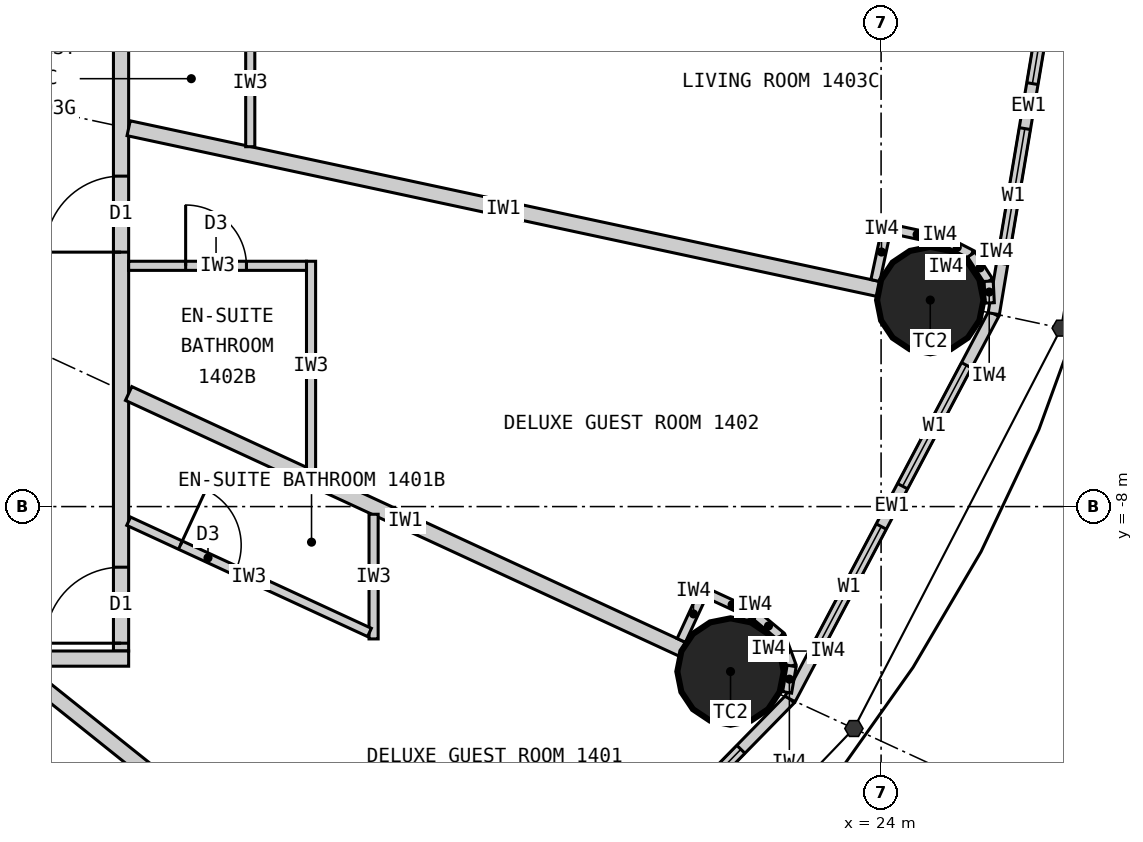
"""IFC4 building model, lengths in metres.
Left out: names, types, materials, properties, quantities, classifications, styles, units other than length and angle.
Written with IfcOpenShell. Run it as: python <this file> out.ifc"""

import sys

from ifc_helpers import new_model, si_unit, direction, frame, frame_2d, origin, origin_2d, place, context, subcontext, project, spatial, rectangle, circle, extrude, element, fill, save


model = new_model("IFC4")
c1 = context("Model", 3, precision=1e-05, world=origin(), true_north=direction((0.0, 1.0)))
c2 = subcontext(c1, "Body", "Model", "MODEL_VIEW")
j1 = project(units=[si_unit("LENGTHUNIT", "METRE"), si_unit("PLANEANGLEUNIT", "RADIAN")], contexts=[c1])
p1 = place(None, origin())
s1 = spatial("IfcSite", under=j1, at=p1, CompositionType="ELEMENT")
p2 = place(p1, origin())
s2 = spatial("IfcBuilding", under=s1, at=p2, CompositionType="ELEMENT")
p3 = place(p2, frame((0.0, 0.0, 60.6)))
s3 = spatial("IfcBuildingStorey", under=s2, at=p3, CompositionType="ELEMENT", Elevation=60.6)
for number, where, z_axis, x_axis in (
    (1, (22.019, -10.17, 0.0), (0.0, 0.0, 1.0), (1.0, 0.0, 0.0)),
    (2, (24.647, -5.283, 0.0), (0.0, 0.0, 1.0), (1.0, 0.0, 0.0)),
):
    element("IfcColumn", number, at=place(p3, frame(where, z_axis=z_axis, x_axis=x_axis)), inside=s3, PredefinedType="COLUMN", context=c2, shape_type="SweptSolid", body=[
        extrude(circle(Radius=0.7, at=origin_2d()), origin(), (0.0, 0.0, 1.0), 3.3),
    ])
p4 = place(p3, frame((18.57, -14.856, 0.0), z_axis=(0.0, 0.0, 1.0), x_axis=(0.699602905915, 0.714531856557, 0.0)))
e3 = element("IfcWall", 3, at=p4, inside=s3, PredefinedType="ELEMENTEDWALL", context=c2, shape_type="SweptSolid", body=[
    extrude(rectangle(XDim=6.051, YDim=0.15, at=frame_2d((3.025, 0.0))), origin(), (0.0, 0.0, 1.0), 3.12),
])
p5 = place(p4, frame((0.926, 0.0, 0.9)))
e4 = element("IfcOpeningElement", 4, at=p5, cuts=e3, PredefinedType="OPENING", context=c2, shape_type="SweptSolid", body=[
    extrude(rectangle(XDim=1.8, YDim=1.9, at=frame_2d((0.9, 0.95))), frame((0.0, 0.085, 0.0), z_axis=(0.0, -1.0, 0.0), x_axis=(1.0, 0.0, 0.0)), (0.0, 0.0, 1.0), 0.17),
])
p6 = place(p4, frame((3.325, 0.0, 0.9)))
e5 = element("IfcOpeningElement", 5, at=p6, cuts=e3, PredefinedType="OPENING", context=c2, shape_type="SweptSolid", body=[
    extrude(rectangle(XDim=1.8, YDim=1.9, at=frame_2d((0.9, 0.95))), frame((0.0, 0.085, 0.0), z_axis=(0.0, -1.0, 0.0), x_axis=(1.0, 0.0, 0.0)), (0.0, 0.0, 1.0), 0.17),
])
p7 = place(p3, frame((22.803, -10.532, 0.0), z_axis=(0.0, 0.0, 1.0), x_axis=(0.467296867008, 0.884100468321, 0.0)))
e6 = element("IfcWall", 6, at=p7, inside=s3, PredefinedType="ELEMENTEDWALL", context=c2, shape_type="SweptSolid", body=[
    extrude(rectangle(XDim=5.734, YDim=0.15, at=frame_2d((2.867, 0.0))), origin(), (0.0, 0.0, 1.0), 3.12),
])
p8 = place(p7, frame((0.767, 0.0, 0.9)))
e7 = element("IfcOpeningElement", 7, at=p8, cuts=e6, PredefinedType="OPENING", context=c2, shape_type="SweptSolid", body=[
    extrude(rectangle(XDim=1.8, YDim=1.9, at=frame_2d((0.9, 0.95))), frame((0.0, 0.085, 0.0), z_axis=(0.0, -1.0, 0.0), x_axis=(1.0, 0.0, 0.0)), (0.0, 0.0, 1.0), 0.17),
])
p9 = place(p7, frame((3.167, 0.0, 0.9)))
e8 = element("IfcOpeningElement", 8, at=p9, cuts=e6, PredefinedType="OPENING", context=c2, shape_type="SweptSolid", body=[
    extrude(rectangle(XDim=1.8, YDim=1.9, at=frame_2d((0.9, 0.95))), frame((0.0, 0.085, 0.0), z_axis=(0.0, -1.0, 0.0), x_axis=(1.0, 0.0, 0.0)), (0.0, 0.0, 1.0), 0.17),
])
p10 = place(p3, frame((25.482, -5.462, 0.0), z_axis=(0.0, 0.0, 1.0), x_axis=(0.165642551694, 0.986185857264, 0.0)))
e9 = element("IfcWall", 9, at=p10, inside=s3, PredefinedType="ELEMENTEDWALL", context=c2, shape_type="SweptSolid", body=[
    extrude(rectangle(XDim=5.539, YDim=0.15, at=frame_2d((2.77, 0.0))), origin(), (0.0, 0.0, 1.0), 3.12),
])
p11 = place(p10, frame((0.669, 0.0, 0.9)))
e10 = element("IfcOpeningElement", 10, at=p11, cuts=e9, PredefinedType="OPENING", context=c2, shape_type="SweptSolid", body=[
    extrude(rectangle(XDim=1.8, YDim=1.9, at=frame_2d((0.9, 0.95))), frame((0.0, 0.085, 0.0), z_axis=(0.0, -1.0, 0.0), x_axis=(1.0, 0.0, 0.0)), (0.0, 0.0, 1.0), 0.17),
])
p12 = place(p10, frame((3.07, 0.0, 0.9)))
e11 = element("IfcOpeningElement", 11, at=p12, cuts=e9, PredefinedType="OPENING", context=c2, shape_type="SweptSolid", body=[
    extrude(rectangle(XDim=1.8, YDim=1.9, at=frame_2d((0.9, 0.95))), frame((0.0, 0.085, 0.0), z_axis=(0.0, -1.0, 0.0), x_axis=(1.0, 0.0, 0.0)), (0.0, 0.0, 1.0), 0.17),
])
p13 = place(p3, frame((14.0, -9.9, 0.0), z_axis=(0.0, 0.0, 1.0), x_axis=(0.0, 1.0, 0.0)))
e12 = element("IfcWall", 12, at=p13, inside=s3, PredefinedType="PARTITIONING", context=c2, shape_type="SweptSolid", body=[
    extrude(rectangle(XDim=19.8, YDim=0.2, at=frame_2d((9.9, 0.0))), origin(), (0.0, 0.0, 1.0), 3.12),
])
p14 = place(p13, frame((0.103, 0.0, 0.0)))
e13 = element("IfcOpeningElement", 13, at=p14, cuts=e12, PredefinedType="OPENING", context=c2, shape_type="SweptSolid", body=[
    extrude(rectangle(XDim=1.0, YDim=2.2, at=frame_2d((0.5, 1.1))), frame((0.0, 0.11, 0.0), z_axis=(0.0, -1.0, 0.0), x_axis=(1.0, 0.0, 0.0)), (0.0, 0.0, 1.0), 0.22),
])
p15 = place(p13, frame((5.248, 0.0, 0.0)))
e14 = element("IfcOpeningElement", 14, at=p15, cuts=e12, PredefinedType="OPENING", context=c2, shape_type="SweptSolid", body=[
    extrude(rectangle(XDim=1.0, YDim=2.2, at=frame_2d((0.5, 1.1))), frame((0.0, 0.11, 0.0), z_axis=(0.0, -1.0, 0.0), x_axis=(1.0, 0.0, 0.0)), (0.0, 0.0, 1.0), 0.22),
])
p16 = place(p13, frame((8.438, 0.0, 0.0)))
e15 = element("IfcOpeningElement", 15, at=p16, cuts=e12, PredefinedType="OPENING", context=c2, shape_type="SweptSolid", body=[
    extrude(rectangle(XDim=1.0, YDim=2.2, at=frame_2d((0.5, 1.1))), frame((0.0, 0.11, 0.0), z_axis=(0.0, -1.0, 0.0), x_axis=(1.0, 0.0, 0.0)), (0.0, 0.0, 1.0), 0.22),
])
p17 = place(p13, frame((14.532, 0.0, 0.0)))
e16 = element("IfcOpeningElement", 16, at=p17, cuts=e12, PredefinedType="OPENING", context=c2, shape_type="SweptSolid", body=[
    extrude(rectangle(XDim=1.0, YDim=2.2, at=frame_2d((0.5, 1.1))), frame((0.0, 0.11, 0.0), z_axis=(0.0, -1.0, 0.0), x_axis=(1.0, 0.0, 0.0)), (0.0, 0.0, 1.0), 0.22),
])
p18 = place(p3, frame((14.1, -10.0, 0.0), z_axis=(0.0, 0.0, 1.0), x_axis=(-1.0, 0.0, 0.0)))
e17 = element("IfcWall", 17, at=p18, inside=s3, PredefinedType="PARTITIONING", context=c2, shape_type="SweptSolid", body=[
    extrude(rectangle(XDim=28.2, YDim=0.2, at=frame_2d((14.1, 0.0))), origin(), (0.0, 0.0, 1.0), 3.12),
])
p19 = place(p18, frame((23.865, 0.0, 0.0)))
e18 = element("IfcOpeningElement", 18, at=p19, cuts=e17, PredefinedType="OPENING", context=c2, shape_type="SweptSolid", body=[
    extrude(rectangle(XDim=1.0, YDim=2.2, at=frame_2d((0.5, 1.1))), frame((0.0, 0.11, 0.0), z_axis=(0.0, -1.0, 0.0), x_axis=(1.0, 0.0, 0.0)), (0.0, 0.0, 1.0), 0.22),
])
p20 = place(p18, frame((18.529, 0.0, 0.0)))
e19 = element("IfcOpeningElement", 19, at=p20, cuts=e17, PredefinedType="OPENING", context=c2, shape_type="SweptSolid", body=[
    extrude(rectangle(XDim=1.0, YDim=2.2, at=frame_2d((0.5, 1.1))), frame((0.0, 0.11, 0.0), z_axis=(0.0, -1.0, 0.0), x_axis=(1.0, 0.0, 0.0)), (0.0, 0.0, 1.0), 0.22),
])
p21 = place(p18, frame((14.623, 0.0, 0.0)))
e20 = element("IfcOpeningElement", 20, at=p21, cuts=e17, PredefinedType="OPENING", context=c2, shape_type="SweptSolid", body=[
    extrude(rectangle(XDim=1.0, YDim=2.2, at=frame_2d((0.5, 1.1))), frame((0.0, 0.11, 0.0), z_axis=(0.0, -1.0, 0.0), x_axis=(1.0, 0.0, 0.0)), (0.0, 0.0, 1.0), 0.22),
])
p22 = place(p18, frame((11.24, 0.0, 0.0)))
e21 = element("IfcOpeningElement", 21, at=p22, cuts=e17, PredefinedType="OPENING", context=c2, shape_type="SweptSolid", body=[
    extrude(rectangle(XDim=1.0, YDim=2.2, at=frame_2d((0.5, 1.1))), frame((0.0, 0.11, 0.0), z_axis=(0.0, -1.0, 0.0), x_axis=(1.0, 0.0, 0.0)), (0.0, 0.0, 1.0), 0.22),
])
p23 = place(p18, frame((8.671, 0.0, 0.0)))
e22 = element("IfcOpeningElement", 22, at=p23, cuts=e17, PredefinedType="OPENING", context=c2, shape_type="SweptSolid", body=[
    extrude(rectangle(XDim=1.0, YDim=2.2, at=frame_2d((0.5, 1.1))), frame((0.0, 0.11, 0.0), z_axis=(0.0, -1.0, 0.0), x_axis=(1.0, 0.0, 0.0)), (0.0, 0.0, 1.0), 0.22),
])
p24 = place(p18, frame((2.801, 0.0, 0.0)))
e23 = element("IfcOpeningElement", 23, at=p24, cuts=e17, PredefinedType="OPENING", context=c2, shape_type="SweptSolid", body=[
    extrude(rectangle(XDim=1.0, YDim=2.2, at=frame_2d((0.5, 1.1))), frame((0.0, 0.11, 0.0), z_axis=(0.0, -1.0, 0.0), x_axis=(1.0, 0.0, 0.0)), (0.0, 0.0, 1.0), 0.22),
])
p25 = place(p3, frame((12.625, -10.1, 0.0), z_axis=(0.0, 0.0, 1.0), x_axis=(0.780892451574, -0.624665493744, 0.0)))
e24 = element("IfcWall", 24, at=p25, inside=s3, PredefinedType="PARTITIONING", context=c2, shape_type="SweptSolid", body=[
    extrude(rectangle(XDim=6.045, YDim=0.2, at=frame_2d((3.022, 0.0))), origin(), (0.0, 0.0, 1.0), 2.32),
])
p26 = place(p3, frame((14.1, -6.512, 0.0), z_axis=(0.0, 0.0, 1.0), x_axis=(0.907832871056, -0.419332181247, 0.0)))
e25 = element("IfcWall", 25, at=p26, inside=s3, PredefinedType="PARTITIONING", context=c2, shape_type="SweptSolid", body=[
    extrude(rectangle(XDim=8.023, YDim=0.2, at=frame_2d((4.011, 0.0))), origin(), (0.0, 0.0, 1.0), 2.32),
])
p27 = place(p3, frame((14.1, -3.022, 0.0), z_axis=(0.0, 0.0, 1.0), x_axis=(0.977790014929, -0.209586943072, 0.0)))
e26 = element("IfcWall", 26, at=p27, inside=s3, PredefinedType="PARTITIONING", context=c2, shape_type="SweptSolid", body=[
    extrude(rectangle(XDim=10.087, YDim=0.2, at=frame_2d((5.043, 0.0))), origin(), (0.0, 0.0, 1.0), 2.32),
])
p28 = place(p3, frame((17.323, -8.101, 0.0), z_axis=(0.0, 0.0, 1.0), x_axis=(0.0, -1.0, 0.0)))
e27 = element("IfcWall", 27, at=p28, inside=s3, PredefinedType="PARTITIONING", context=c2, shape_type="SweptSolid", body=[
    extrude(rectangle(XDim=1.64, YDim=0.12, at=frame_2d((0.82, 0.0))), origin(), (0.0, 0.0, 1.0), 3.12),
])
p29 = place(p3, frame((14.1, -8.193, 0.0), z_axis=(0.0, 0.0, 1.0), x_axis=(0.907836493557, -0.419324338628, 0.0)))
e28 = element("IfcWall", 28, at=p29, inside=s3, PredefinedType="PARTITIONING", context=c2, shape_type="SweptSolid", body=[
    extrude(rectangle(XDim=3.49, YDim=0.12, at=frame_2d((1.745, 0.0))), origin(), (0.0, 0.0, 1.0), 3.12),
])
p30 = place(p29, frame((0.75, 0.0, 0.0)))
e29 = element("IfcOpeningElement", 29, at=p30, cuts=e28, PredefinedType="OPENING", context=c2, shape_type="SweptSolid", body=[
    extrude(rectangle(XDim=0.8, YDim=2.1, at=frame_2d((0.4, 1.05))), frame((0.0, 0.07, 0.0), z_axis=(0.0, -1.0, 0.0), x_axis=(1.0, 0.0, 0.0)), (0.0, 0.0, 1.0), 0.14),
])
p31 = place(p3, frame((16.5, -7.521, 0.0), z_axis=(0.0, 0.0, 1.0), x_axis=(0.0, 1.0, 0.0)))
e30 = element("IfcWall", 30, at=p31, inside=s3, PredefinedType="PARTITIONING", context=c2, shape_type="SweptSolid", body=[
    extrude(rectangle(XDim=2.749, YDim=0.12, at=frame_2d((1.374, 0.0))), origin(), (0.0, 0.0, 1.0), 3.12),
])
p32 = place(p3, frame((14.1, -4.833, 0.0), z_axis=(0.0, 0.0, 1.0), x_axis=(1.0, 0.0, 0.0)))
e31 = element("IfcWall", 31, at=p32, inside=s3, PredefinedType="PARTITIONING", context=c2, shape_type="SweptSolid", body=[
    extrude(rectangle(XDim=2.34, YDim=0.12, at=frame_2d((1.17, 0.0))), origin(), (0.0, 0.0, 1.0), 3.12),
])
p33 = place(p32, frame((0.75, 0.0, 0.0)))
e32 = element("IfcOpeningElement", 32, at=p33, cuts=e31, PredefinedType="OPENING", context=c2, shape_type="SweptSolid", body=[
    extrude(rectangle(XDim=0.8, YDim=2.1, at=frame_2d((0.4, 1.05))), frame((0.0, 0.07, 0.0), z_axis=(0.0, -1.0, 0.0), x_axis=(1.0, 0.0, 0.0)), (0.0, 0.0, 1.0), 0.14),
])
p34 = place(p3, frame((15.7, -3.265, 0.0), z_axis=(0.0, 0.0, 1.0), x_axis=(0.0, 1.0, 0.0)))
e33 = element("IfcWall", 33, at=p34, inside=s3, PredefinedType="PARTITIONING", context=c2, shape_type="SweptSolid", body=[
    extrude(rectangle(XDim=1.683, YDim=0.12, at=frame_2d((0.841, 0.0))), origin(), (0.0, 0.0, 1.0), 3.12),
])
p35 = place(p3, frame((21.371, -9.761, 0.0), z_axis=(0.0, 0.0, 1.0), x_axis=(0.419259891039, 0.907866258744, 0.0)))
e34 = element("IfcWall", 34, at=p35, inside=s3, PredefinedType="PARTITIONING", context=c2, shape_type="SweptSolid", body=[
    extrude(rectangle(XDim=0.768, YDim=0.12, at=frame_2d((0.384, 0.0))), origin(), (0.0, 0.0, 1.0), 3.12),
])
p36 = place(p3, frame((21.722, -9.144, 0.0), z_axis=(0.0, 0.0, 1.0), x_axis=(0.907877701396, -0.419235112208, 0.0)))
e35 = element("IfcWall", 35, at=p36, inside=s3, PredefinedType="PARTITIONING", context=c2, shape_type="SweptSolid", body=[
    extrude(rectangle(XDim=0.7, YDim=0.12, at=frame_2d((0.35, 0.0))), origin(), (0.0, 0.0, 1.0), 3.12),
])
p37 = place(p3, frame((22.358, -9.437, 0.0), z_axis=(0.0, 0.0, 1.0), x_axis=(0.768412687942, -0.639954639806, 0.0)))
e36 = element("IfcWall", 36, at=p37, inside=s3, PredefinedType="PARTITIONING", context=c2, shape_type="SweptSolid", body=[
    extrude(rectangle(XDim=0.418, YDim=0.12, at=frame_2d((0.209, 0.0))), origin(), (0.0, 0.0, 1.0), 3.12),
])
p38 = place(p3, frame((22.679, -9.705, 0.0), z_axis=(0.0, 0.0, 1.0), x_axis=(0.345164001646, -0.938542386879, 0.0)))
e37 = element("IfcWall", 37, at=p38, inside=s3, PredefinedType="PARTITIONING", context=c2, shape_type="SweptSolid", body=[
    extrude(rectangle(XDim=0.418, YDim=0.12, at=frame_2d((0.209, 0.0))), origin(), (0.0, 0.0, 1.0), 3.12),
])
p39 = place(p3, frame((22.823, -10.097, 0.0), z_axis=(0.0, 0.0, 1.0), x_axis=(-0.169674995186, -0.985500074079, 0.0)))
e38 = element("IfcWall", 38, at=p39, inside=s3, PredefinedType="PARTITIONING", context=c2, shape_type="SweptSolid", body=[
    extrude(rectangle(XDim=0.353, YDim=0.12, at=frame_2d((0.176, 0.0))), origin(), (0.0, 0.0, 1.0), 3.12),
])
p40 = place(p3, frame((23.925, -5.026, 0.0), z_axis=(0.0, 0.0, 1.0), x_axis=(0.209681192172, 0.977769808109, 0.0)))
e39 = element("IfcWall", 39, at=p40, inside=s3, PredefinedType="PARTITIONING", context=c2, shape_type="SweptSolid", body=[
    extrude(rectangle(XDim=0.767, YDim=0.12, at=frame_2d((0.384, 0.0))), origin(), (0.0, 0.0, 1.0), 3.12),
])
p41 = place(p3, frame((24.132, -4.347, 0.0), z_axis=(0.0, 0.0, 1.0), x_axis=(0.977776882509, -0.209648200638, 0.0)))
e40 = element("IfcWall", 40, at=p41, inside=s3, PredefinedType="PARTITIONING", context=c2, shape_type="SweptSolid", body=[
    extrude(rectangle(XDim=0.7, YDim=0.12, at=frame_2d((0.35, 0.0))), origin(), (0.0, 0.0, 1.0), 3.12),
])
for number, where, z_axis, x_axis in (
    (41, (24.816, -4.494, 0.0), (0.0, 0.0, 1.0), (0.89, -0.455, 0.0)),
    (42, (25.188, -4.684, 0.0), (0.0, 0.0, 1.0), (0.543, -0.84, 0.0)),
):
    element("IfcWall", number, at=place(p3, frame(where, z_axis=z_axis, x_axis=x_axis)), inside=s3, PredefinedType="PARTITIONING", context=c2, shape_type="SweptSolid", body=[
        extrude(rectangle(XDim=0.418, YDim=0.12, at=frame_2d((0.209, 0.0))), origin(), (0.0, 0.0, 1.0), 3.12),
    ])
p42 = place(p3, frame((25.416, -5.035, 0.0), z_axis=(0.0, 0.0, 1.0), x_axis=(0.050406329159, -0.998728793007, 0.0)))
e43 = element("IfcWall", 43, at=p42, inside=s3, PredefinedType="PARTITIONING", context=c2, shape_type="SweptSolid", body=[
    extrude(rectangle(XDim=0.286, YDim=0.12, at=frame_2d((0.143, 0.0))), origin(), (0.0, 0.0, 1.0), 3.12),
])
p43 = place(p6, origin())
e44 = element("IfcWindow", 44, at=p43, inside=s3, PartitioningType="SINGLE_PANEL", PredefinedType="WINDOW", context=c2, shape_type="SweptSolid", body=[
    extrude(rectangle(XDim=1.8, YDim=1.9, at=frame_2d((0.9, 0.95))), frame((0.0, 0.03, 0.0), z_axis=(0.0, -1.0, 0.0), x_axis=(1.0, 0.0, 0.0)), (0.0, 0.0, 1.0), 0.06),
])
fill(e5, e44)
p44 = place(p8, origin())
e45 = element("IfcWindow", 45, at=p44, inside=s3, PartitioningType="SINGLE_PANEL", PredefinedType="WINDOW", context=c2, shape_type="SweptSolid", body=[
    extrude(rectangle(XDim=1.8, YDim=1.9, at=frame_2d((0.9, 0.95))), frame((0.0, 0.03, 0.0), z_axis=(0.0, -1.0, 0.0), x_axis=(1.0, 0.0, 0.0)), (0.0, 0.0, 1.0), 0.06),
])
fill(e7, e45)
p45 = place(p9, origin())
e46 = element("IfcWindow", 46, at=p45, inside=s3, PartitioningType="SINGLE_PANEL", PredefinedType="WINDOW", context=c2, shape_type="SweptSolid", body=[
    extrude(rectangle(XDim=1.8, YDim=1.9, at=frame_2d((0.9, 0.95))), frame((0.0, 0.03, 0.0), z_axis=(0.0, -1.0, 0.0), x_axis=(1.0, 0.0, 0.0)), (0.0, 0.0, 1.0), 0.06),
])
fill(e8, e46)
p46 = place(p11, origin())
e47 = element("IfcWindow", 47, at=p46, inside=s3, PartitioningType="SINGLE_PANEL", PredefinedType="WINDOW", context=c2, shape_type="SweptSolid", body=[
    extrude(rectangle(XDim=1.8, YDim=1.9, at=frame_2d((0.9, 0.95))), frame((0.0, 0.03, 0.0), z_axis=(0.0, -1.0, 0.0), x_axis=(1.0, 0.0, 0.0)), (0.0, 0.0, 1.0), 0.06),
])
fill(e10, e47)
p47 = place(p12, origin())
e48 = element("IfcWindow", 48, at=p47, inside=s3, PartitioningType="SINGLE_PANEL", PredefinedType="WINDOW", context=c2, shape_type="SweptSolid", body=[
    extrude(rectangle(XDim=1.8, YDim=1.9, at=frame_2d((0.9, 0.95))), frame((0.0, 0.03, 0.0), z_axis=(0.0, -1.0, 0.0), x_axis=(1.0, 0.0, 0.0)), (0.0, 0.0, 1.0), 0.06),
])
fill(e11, e48)
p48 = place(p30, origin())
e49 = element("IfcDoor", 49, at=p48, inside=s3, OperationType="SINGLE_SWING_LEFT", PredefinedType="DOOR", context=c2, shape_type="SweptSolid", body=[
    extrude(rectangle(XDim=0.8, YDim=2.1, at=frame_2d((0.4, 1.05))), frame((0.0, 0.025, 0.0), z_axis=(0.0, -1.0, 0.0), x_axis=(1.0, 0.0, 0.0)), (0.0, 0.0, 1.0), 0.05),
])
fill(e29, e49)
p49 = place(p14, origin())
e50 = element("IfcDoor", 50, at=p49, inside=s3, OperationType="SINGLE_SWING_LEFT", PredefinedType="DOOR", context=c2, shape_type="SweptSolid", body=[
    extrude(rectangle(XDim=1.0, YDim=2.2, at=frame_2d((0.5, 1.1))), frame((0.0, 0.025, 0.0), z_axis=(0.0, -1.0, 0.0), x_axis=(1.0, 0.0, 0.0)), (0.0, 0.0, 1.0), 0.05),
])
fill(e13, e50)
p50 = place(p33, origin())
e51 = element("IfcDoor", 51, at=p50, inside=s3, OperationType="SINGLE_SWING_LEFT", PredefinedType="DOOR", context=c2, shape_type="SweptSolid", body=[
    extrude(rectangle(XDim=0.8, YDim=2.1, at=frame_2d((0.4, 1.05))), frame((0.0, 0.025, 0.0), z_axis=(0.0, -1.0, 0.0), x_axis=(1.0, 0.0, 0.0)), (0.0, 0.0, 1.0), 0.05),
])
fill(e32, e51)
p51 = place(p15, origin())
e52 = element("IfcDoor", 52, at=p51, inside=s3, OperationType="SINGLE_SWING_LEFT", PredefinedType="DOOR", context=c2, shape_type="SweptSolid", body=[
    extrude(rectangle(XDim=1.0, YDim=2.2, at=frame_2d((0.5, 1.1))), frame((0.0, 0.025, 0.0), z_axis=(0.0, -1.0, 0.0), x_axis=(1.0, 0.0, 0.0)), (0.0, 0.0, 1.0), 0.05),
])
fill(e14, e52)
save(model, sys.argv[1])
